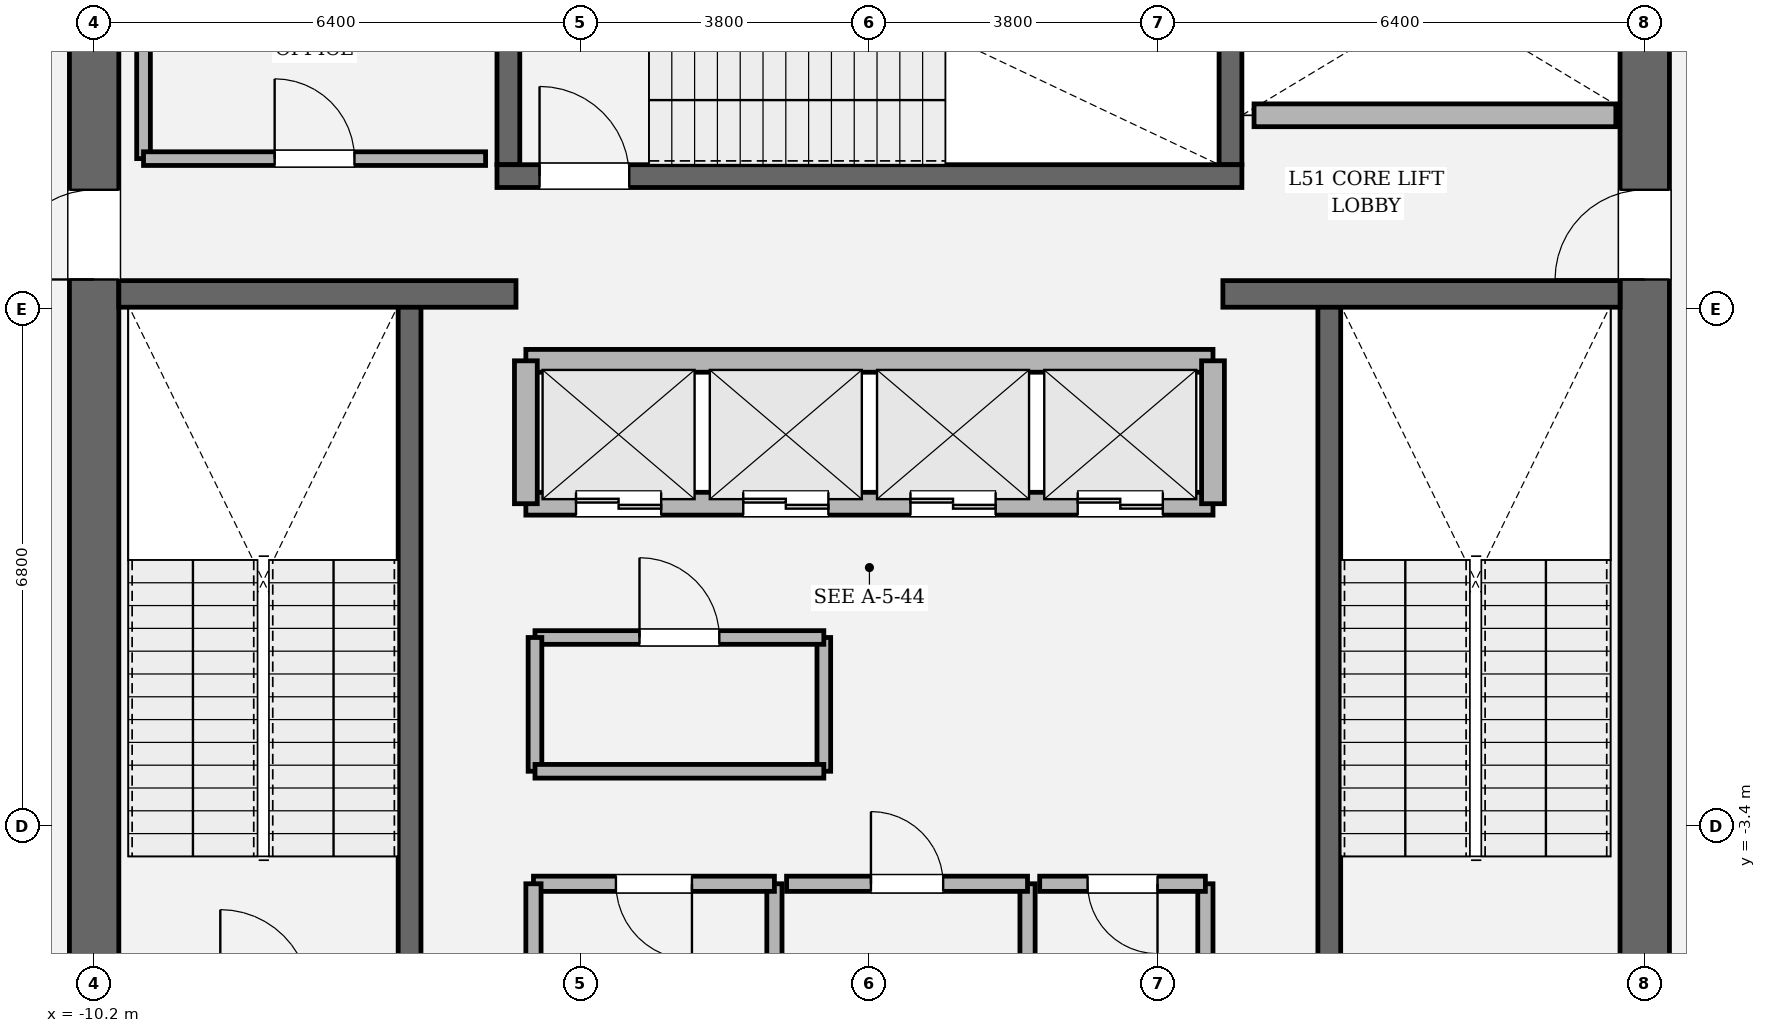
"""IFC4 building model, lengths in metres.
Left out: names, types, materials, properties, quantities, classifications, styles, units other than length and angle.
Written with IfcOpenShell. Run it as: python <this file> out.ifc"""

import sys

from ifc_helpers import new_model, si_unit, direction, frame, frame_2d, origin, place, context, subcontext, project, spatial, rectangle, extrude, element, fill, save


model = new_model("IFC4")
c1 = context("Model", 3, precision=1e-05, world=origin(), true_north=direction((0.0, 1.0)))
c2 = subcontext(c1, "Body", "Model", "MODEL_VIEW")
j1 = project(units=[si_unit("LENGTHUNIT", "METRE"), si_unit("PLANEANGLEUNIT", "RADIAN")], contexts=[c1])
p1 = place(None, origin())
s1 = spatial("IfcSite", under=j1, at=p1, CompositionType="ELEMENT")
p2 = place(p1, origin())
s2 = spatial("IfcBuilding", under=s1, at=p2, CompositionType="ELEMENT")
p3 = place(p2, frame((0.0, 0.0, 216.75)))
s3 = spatial("IfcBuildingStorey", under=s2, at=p3, CompositionType="ELEMENT", Elevation=216.75)
p4 = place(p3, frame((-10.2, -8.875, 0.0), z_axis=(0.0, 0.0, 1.0), x_axis=(0.0, 1.0, 0.0)))
e1 = element("IfcWall", 1, at=p4, inside=s3, PredefinedType="SHEAR", context=c2, shape_type="SweptSolid", body=[
    extrude(rectangle(XDim=17.75, YDim=0.65, at=frame_2d((8.875, 0.0))), origin(), (0.0, 0.0, 1.0), 4.05),
])
p5 = place(p4, frame((12.665, 0.0, 0.0)))
e2 = element("IfcOpeningElement", 2, at=p5, cuts=e1, PredefinedType="OPENING", context=c2, shape_type="SweptSolid", body=[
    extrude(rectangle(XDim=1.18, YDim=2.2, at=frame_2d((0.59, 1.1))), frame((0.0, 0.335, 0.0), z_axis=(0.0, -1.0, 0.0), x_axis=(1.0, 0.0, 0.0)), (0.0, 0.0, 1.0), 0.67),
])
p6 = place(p3, frame((10.2, 8.875, 0.0), z_axis=(0.0, 0.0, 1.0), x_axis=(0.0, -1.0, 0.0)))
e3 = element("IfcWall", 3, at=p6, inside=s3, PredefinedType="SHEAR", context=c2, shape_type="SweptSolid", body=[
    extrude(rectangle(XDim=17.75, YDim=0.65, at=frame_2d((8.875, 0.0))), origin(), (0.0, 0.0, 1.0), 4.05),
])
p7 = place(p6, frame((3.905, 0.0, 0.0)))
e4 = element("IfcOpeningElement", 4, at=p7, cuts=e3, PredefinedType="OPENING", context=c2, shape_type="SweptSolid", body=[
    extrude(rectangle(XDim=1.18, YDim=2.2, at=frame_2d((0.59, 1.1))), frame((0.0, 0.335, 0.0), z_axis=(0.0, -1.0, 0.0), x_axis=(1.0, 0.0, 0.0)), (0.0, 0.0, 1.0), 0.67),
])
for number, where, z_axis, x_axis in (
    (5, (-6.05, -5.5, 0.0), (0.0, 0.0, 1.0), (0.0, 1.0, 0.0)),
    (6, (6.05, 3.45, 0.0), (0.0, 0.0, 1.0), (0.0, -1.0, 0.0)),
):
    element("IfcWall", number, at=place(p3, frame(where, z_axis=z_axis, x_axis=x_axis)), inside=s3, PredefinedType="SOLIDWALL", context=c2, shape_type="SweptSolid", body=[
        extrude(rectangle(XDim=8.95, YDim=0.3, at=frame_2d((4.475, 0.0))), origin(), (0.0, 0.0, 1.0), 4.05),
    ])
for number, where, z_axis, x_axis in (
    (7, (-4.75, 5.3, 0.0), (0.0, 0.0, 1.0), (0.0, 1.0, 0.0)),
    (8, (4.75, 8.875, 0.0), (0.0, 0.0, 1.0), (0.0, -1.0, 0.0)),
):
    element("IfcWall", number, at=place(p3, frame(where, z_axis=z_axis, x_axis=x_axis)), inside=s3, PredefinedType="SOLIDWALL", context=c2, shape_type="SweptSolid", body=[
        extrude(rectangle(XDim=3.575, YDim=0.3, at=frame_2d((1.788, 0.0))), origin(), (0.0, 0.0, 1.0), 4.05),
    ])
p8 = place(p3, frame((-4.9, 5.15, 0.0), z_axis=(0.0, 0.0, 1.0), x_axis=(1.0, 0.0, 0.0)))
e9 = element("IfcWall", 9, at=p8, inside=s3, PredefinedType="SOLIDWALL", context=c2, shape_type="SweptSolid", body=[
    extrude(rectangle(XDim=9.8, YDim=0.3, at=frame_2d((4.9, 0.0))), origin(), (0.0, 0.0, 1.0), 4.05),
])
p9 = place(p8, frame((0.56, 0.0, 0.0)))
e10 = element("IfcOpeningElement", 10, at=p9, cuts=e9, PredefinedType="OPENING", context=c2, shape_type="SweptSolid", body=[
    extrude(rectangle(XDim=1.18, YDim=2.2, at=frame_2d((0.59, 1.1))), frame((0.0, 0.16, 0.0), z_axis=(0.0, -1.0, 0.0), x_axis=(1.0, 0.0, 0.0)), (0.0, 0.0, 1.0), 0.32),
])
for number, where, z_axis, x_axis in (
    (11, (-9.875, 3.6, 0.0), (0.0, 0.0, 1.0), (1.0, 0.0, 0.0)),
    (12, (4.65, 3.6, 0.0), (0.0, 0.0, 1.0), (1.0, 0.0, 0.0)),
):
    element("IfcWall", number, at=place(p3, frame(where, z_axis=z_axis, x_axis=x_axis)), inside=s3, PredefinedType="SOLIDWALL", context=c2, shape_type="SweptSolid", body=[
        extrude(rectangle(XDim=5.225, YDim=0.35, at=frame_2d((2.613, 0.0))), origin(), (0.0, 0.0, 1.0), 4.05),
    ])
p10 = place(p3, frame((-4.52, 0.84, 0.0), z_axis=(0.0, 0.0, 1.0), x_axis=(1.0, 0.0, 0.0)))
e13 = element("IfcWall", 13, at=p10, inside=s3, PredefinedType="SOLIDWALL", context=c2, shape_type="SweptSolid", body=[
    extrude(rectangle(XDim=9.04, YDim=0.3, at=frame_2d((4.52, 0.0))), origin(), (0.0, 0.0, 1.0), 3.83),
])
p11 = place(p10, frame((0.66, 0.0, 0.0)))
e14 = element("IfcOpeningElement", 14, at=p11, cuts=e13, PredefinedType="OPENING", context=c2, shape_type="SweptSolid", body=[
    extrude(rectangle(XDim=1.12, YDim=2.25, at=frame_2d((0.56, 1.125))), frame((0.0, 0.16, 0.0), z_axis=(0.0, -1.0, 0.0), x_axis=(1.0, 0.0, 0.0)), (0.0, 0.0, 1.0), 0.32),
])
p12 = place(p10, frame((2.86, 0.0, 0.0)))
e15 = element("IfcOpeningElement", 15, at=p12, cuts=e13, PredefinedType="OPENING", context=c2, shape_type="SweptSolid", body=[
    extrude(rectangle(XDim=1.12, YDim=2.25, at=frame_2d((0.56, 1.125))), frame((0.0, 0.16, 0.0), z_axis=(0.0, -1.0, 0.0), x_axis=(1.0, 0.0, 0.0)), (0.0, 0.0, 1.0), 0.32),
])
p13 = place(p10, frame((5.06, 0.0, 0.0)))
e16 = element("IfcOpeningElement", 16, at=p13, cuts=e13, PredefinedType="OPENING", context=c2, shape_type="SweptSolid", body=[
    extrude(rectangle(XDim=1.12, YDim=2.25, at=frame_2d((0.56, 1.125))), frame((0.0, 0.16, 0.0), z_axis=(0.0, -1.0, 0.0), x_axis=(1.0, 0.0, 0.0)), (0.0, 0.0, 1.0), 0.32),
])
p14 = place(p10, frame((7.26, 0.0, 0.0)))
e17 = element("IfcOpeningElement", 17, at=p14, cuts=e13, PredefinedType="OPENING", context=c2, shape_type="SweptSolid", body=[
    extrude(rectangle(XDim=1.12, YDim=2.25, at=frame_2d((0.56, 1.125))), frame((0.0, 0.16, 0.0), z_axis=(0.0, -1.0, 0.0), x_axis=(1.0, 0.0, 0.0)), (0.0, 0.0, 1.0), 0.32),
])
p15 = place(p3, frame((-4.52, 2.72, 0.0), z_axis=(0.0, 0.0, 1.0), x_axis=(1.0, 0.0, 0.0)))
e18 = element("IfcWall", 18, at=p15, inside=s3, PredefinedType="SOLIDWALL", context=c2, shape_type="SweptSolid", body=[
    extrude(rectangle(XDim=9.04, YDim=0.3, at=frame_2d((4.52, 0.0))), origin(), (0.0, 0.0, 1.0), 3.83),
])
for number, where, z_axis, x_axis in (
    (19, (-4.52, 0.84, 0.0), (0.0, 0.0, 1.0), (0.0, 1.0, 0.0)),
    (20, (4.52, 0.84, 0.0), (0.0, 0.0, 1.0), (0.0, 1.0, 0.0)),
):
    element("IfcWall", number, at=place(p3, frame(where, z_axis=z_axis, x_axis=x_axis)), inside=s3, PredefinedType="SOLIDWALL", context=c2, shape_type="SweptSolid", body=[
        extrude(rectangle(XDim=1.88, YDim=0.3, at=frame_2d((0.94, 0.0))), origin(), (0.0, 0.0, 1.0), 3.83),
    ])
p16 = place(p3, frame((5.06, 5.95, 0.0), z_axis=(0.0, 0.0, 1.0), x_axis=(1.0, 0.0, 0.0)))
e21 = element("IfcWall", 21, at=p16, inside=s3, PredefinedType="SOLIDWALL", context=c2, shape_type="SweptSolid", body=[
    extrude(rectangle(XDim=4.76, YDim=0.3, at=frame_2d((2.38, 0.0))), origin(), (0.0, 0.0, 1.0), 3.83),
])
p17 = place(p3, frame((-1.25, -5.9, 0.0), z_axis=(0.0, 0.0, 1.0), x_axis=(0.0, 1.0, 0.0)))
e22 = element("IfcWall", 22, at=p17, inside=s3, PredefinedType="SOLIDWALL", context=c2, shape_type="SweptSolid", body=[
    extrude(rectangle(XDim=1.74, YDim=0.2, at=frame_2d((0.87, 0.0))), origin(), (0.0, 0.0, 1.0), 3.83),
])
p18 = place(p3, frame((-1.25, -4.16, 0.0), z_axis=(0.0, 0.0, 1.0), x_axis=(-1.0, 0.0, 0.0)))
e23 = element("IfcWall", 23, at=p18, inside=s3, PredefinedType="SOLIDWALL", context=c2, shape_type="SweptSolid", body=[
    extrude(rectangle(XDim=3.17, YDim=0.2, at=frame_2d((1.585, 0.0))), origin(), (0.0, 0.0, 1.0), 3.83),
])
p19 = place(p18, frame((1.085, 0.0, 0.0)))
e24 = element("IfcOpeningElement", 24, at=p19, cuts=e23, PredefinedType="OPENING", context=c2, shape_type="SweptSolid", body=[
    extrude(rectangle(XDim=1.0, YDim=2.15, at=frame_2d((0.5, 1.075))), frame((0.0, 0.11, 0.0), z_axis=(0.0, -1.0, 0.0), x_axis=(1.0, 0.0, 0.0)), (0.0, 0.0, 1.0), 0.22),
])
for number, where, z_axis, x_axis in (
    (25, (-4.42, -4.16, 0.0), (0.0, 0.0, 1.0), (0.0, -1.0, 0.0)),
    (26, (2.08, -5.9, 0.0), (0.0, 0.0, 1.0), (0.0, 1.0, 0.0)),
):
    element("IfcWall", number, at=place(p3, frame(where, z_axis=z_axis, x_axis=x_axis)), inside=s3, PredefinedType="SOLIDWALL", context=c2, shape_type="SweptSolid", body=[
        extrude(rectangle(XDim=1.74, YDim=0.2, at=frame_2d((0.87, 0.0))), origin(), (0.0, 0.0, 1.0), 3.83),
    ])
p20 = place(p3, frame((2.08, -4.16, 0.0), z_axis=(0.0, 0.0, 1.0), x_axis=(-1.0, 0.0, 0.0)))
e27 = element("IfcWall", 27, at=p20, inside=s3, PredefinedType="SOLIDWALL", context=c2, shape_type="SweptSolid", body=[
    extrude(rectangle(XDim=3.17, YDim=0.2, at=frame_2d((1.585, 0.0))), origin(), (0.0, 0.0, 1.0), 3.83),
])
p21 = place(p20, frame((1.11, 0.0, 0.0)))
e28 = element("IfcOpeningElement", 28, at=p21, cuts=e27, PredefinedType="OPENING", context=c2, shape_type="SweptSolid", body=[
    extrude(rectangle(XDim=0.95, YDim=2.15, at=frame_2d((0.475, 1.075))), frame((0.0, 0.11, 0.0), z_axis=(0.0, -1.0, 0.0), x_axis=(1.0, 0.0, 0.0)), (0.0, 0.0, 1.0), 0.22),
])
p22 = place(p3, frame((4.42, -5.9, 0.0), z_axis=(0.0, 0.0, 1.0), x_axis=(0.0, 1.0, 0.0)))
e29 = element("IfcWall", 29, at=p22, inside=s3, PredefinedType="SOLIDWALL", context=c2, shape_type="SweptSolid", body=[
    extrude(rectangle(XDim=1.74, YDim=0.2, at=frame_2d((0.87, 0.0))), origin(), (0.0, 0.0, 1.0), 3.83),
])
p23 = place(p3, frame((4.42, -4.16, 0.0), z_axis=(0.0, 0.0, 1.0), x_axis=(-1.0, 0.0, 0.0)))
e30 = element("IfcWall", 30, at=p23, inside=s3, PredefinedType="SOLIDWALL", context=c2, shape_type="SweptSolid", body=[
    extrude(rectangle(XDim=2.18, YDim=0.2, at=frame_2d((1.09, 0.0))), origin(), (0.0, 0.0, 1.0), 3.83),
])
p24 = place(p23, frame((0.63, 0.0, 0.0)))
e31 = element("IfcOpeningElement", 31, at=p24, cuts=e30, PredefinedType="OPENING", context=c2, shape_type="SweptSolid", body=[
    extrude(rectangle(XDim=0.92, YDim=2.1, at=frame_2d((0.46, 1.05))), frame((0.0, 0.11, 0.0), z_axis=(0.0, -1.0, 0.0), x_axis=(1.0, 0.0, 0.0)), (0.0, 0.0, 1.0), 0.22),
])
p25 = place(p3, frame((-0.6, -2.68, 0.0), z_axis=(0.0, 0.0, 1.0), x_axis=(0.0, 1.0, 0.0)))
e32 = element("IfcWall", 32, at=p25, inside=s3, PredefinedType="PARTITIONING", context=c2, shape_type="SweptSolid", body=[
    extrude(rectangle(XDim=1.76, YDim=0.18, at=frame_2d((0.88, 0.0))), origin(), (0.0, 0.0, 1.0), 3.83),
])
p26 = place(p3, frame((-0.6, -0.92, 0.0), z_axis=(0.0, 0.0, 1.0), x_axis=(-1.0, 0.0, 0.0)))
e33 = element("IfcWall", 33, at=p26, inside=s3, PredefinedType="PARTITIONING", context=c2, shape_type="SweptSolid", body=[
    extrude(rectangle(XDim=3.8, YDim=0.18, at=frame_2d((1.9, 0.0))), origin(), (0.0, 0.0, 1.0), 3.83),
])
p27 = place(p26, frame((1.375, 0.0, 0.0)))
e34 = element("IfcOpeningElement", 34, at=p27, cuts=e33, PredefinedType="OPENING", context=c2, shape_type="SweptSolid", body=[
    extrude(rectangle(XDim=1.05, YDim=2.2, at=frame_2d((0.525, 1.1))), frame((0.0, 0.1, 0.0), z_axis=(0.0, -1.0, 0.0), x_axis=(1.0, 0.0, 0.0)), (0.0, 0.0, 1.0), 0.2),
])
p28 = place(p3, frame((-4.4, -0.92, 0.0), z_axis=(0.0, 0.0, 1.0), x_axis=(0.0, -1.0, 0.0)))
e35 = element("IfcWall", 35, at=p28, inside=s3, PredefinedType="PARTITIONING", context=c2, shape_type="SweptSolid", body=[
    extrude(rectangle(XDim=1.76, YDim=0.18, at=frame_2d((0.88, 0.0))), origin(), (0.0, 0.0, 1.0), 3.83),
])
p29 = place(p3, frame((-4.4, -2.68, 0.0), z_axis=(0.0, 0.0, 1.0), x_axis=(1.0, 0.0, 0.0)))
e36 = element("IfcWall", 36, at=p29, inside=s3, PredefinedType="PARTITIONING", context=c2, shape_type="SweptSolid", body=[
    extrude(rectangle(XDim=3.8, YDim=0.18, at=frame_2d((1.9, 0.0))), origin(), (0.0, 0.0, 1.0), 3.83),
])
p30 = place(p3, frame((-9.55, 8.65, 0.0), z_axis=(0.0, 0.0, 1.0), x_axis=(0.0, -1.0, 0.0)))
e37 = element("IfcWall", 37, at=p30, inside=s3, PredefinedType="PARTITIONING", context=c2, shape_type="SweptSolid", body=[
    extrude(rectangle(XDim=3.27, YDim=0.18, at=frame_2d((1.635, 0.0))), origin(), (0.0, 0.0, 1.0), 3.83),
])
p31 = place(p3, frame((-9.55, 5.38, 0.0), z_axis=(0.0, 0.0, 1.0), x_axis=(1.0, 0.0, 0.0)))
e38 = element("IfcWall", 38, at=p31, inside=s3, PredefinedType="PARTITIONING", context=c2, shape_type="SweptSolid", body=[
    extrude(rectangle(XDim=4.5, YDim=0.18, at=frame_2d((2.25, 0.0))), origin(), (0.0, 0.0, 1.0), 3.83),
])
p32 = place(p31, frame((1.725, 0.0, 0.0)))
e39 = element("IfcOpeningElement", 39, at=p32, cuts=e38, PredefinedType="OPENING", context=c2, shape_type="SweptSolid", body=[
    extrude(rectangle(XDim=1.05, YDim=2.2, at=frame_2d((0.525, 1.1))), frame((0.0, 0.1, 0.0), z_axis=(0.0, -1.0, 0.0), x_axis=(1.0, 0.0, 0.0)), (0.0, 0.0, 1.0), 0.2),
])
p33 = place(p9, origin())
e40 = element("IfcDoor", 40, at=p33, inside=s3, OperationType="SINGLE_SWING_LEFT", PredefinedType="DOOR", context=c2, shape_type="SweptSolid", body=[
    extrude(rectangle(XDim=1.18, YDim=2.2, at=frame_2d((0.59, 1.1))), frame((0.0, 0.025, 0.0), z_axis=(0.0, -1.0, 0.0), x_axis=(1.0, 0.0, 0.0)), (0.0, 0.0, 1.0), 0.05),
])
fill(e10, e40)
p34 = place(p5, origin())
e41 = element("IfcDoor", 41, at=p34, inside=s3, OperationType="SINGLE_SWING_LEFT", PredefinedType="DOOR", context=c2, shape_type="SweptSolid", body=[
    extrude(rectangle(XDim=1.18, YDim=2.2, at=frame_2d((0.59, 1.1))), frame((0.0, 0.025, 0.0), z_axis=(0.0, -1.0, 0.0), x_axis=(1.0, 0.0, 0.0)), (0.0, 0.0, 1.0), 0.05),
])
fill(e2, e41)
p35 = place(p7, origin())
e42 = element("IfcDoor", 42, at=p35, inside=s3, OperationType="SINGLE_SWING_RIGHT", PredefinedType="DOOR", context=c2, shape_type="SweptSolid", body=[
    extrude(rectangle(XDim=1.18, YDim=2.2, at=frame_2d((0.59, 1.1))), frame((0.0, 0.025, 0.0), z_axis=(0.0, -1.0, 0.0), x_axis=(1.0, 0.0, 0.0)), (0.0, 0.0, 1.0), 0.05),
])
fill(e4, e42)
p36 = place(p11, origin())
e43 = element("IfcDoor", 43, at=p36, inside=s3, OperationType="DOUBLE_DOOR_SLIDING", PredefinedType="DOOR", context=c2, shape_type="SweptSolid", body=[
    extrude(rectangle(XDim=1.12, YDim=2.25, at=frame_2d((0.56, 1.125))), frame((0.0, 0.025, 0.0), z_axis=(0.0, -1.0, 0.0), x_axis=(1.0, 0.0, 0.0)), (0.0, 0.0, 1.0), 0.05),
])
fill(e14, e43)
p37 = place(p12, origin())
e44 = element("IfcDoor", 44, at=p37, inside=s3, OperationType="DOUBLE_DOOR_SLIDING", PredefinedType="DOOR", context=c2, shape_type="SweptSolid", body=[
    extrude(rectangle(XDim=1.12, YDim=2.25, at=frame_2d((0.56, 1.125))), frame((0.0, 0.025, 0.0), z_axis=(0.0, -1.0, 0.0), x_axis=(1.0, 0.0, 0.0)), (0.0, 0.0, 1.0), 0.05),
])
fill(e15, e44)
p38 = place(p13, origin())
e45 = element("IfcDoor", 45, at=p38, inside=s3, OperationType="DOUBLE_DOOR_SLIDING", PredefinedType="DOOR", context=c2, shape_type="SweptSolid", body=[
    extrude(rectangle(XDim=1.12, YDim=2.25, at=frame_2d((0.56, 1.125))), frame((0.0, 0.025, 0.0), z_axis=(0.0, -1.0, 0.0), x_axis=(1.0, 0.0, 0.0)), (0.0, 0.0, 1.0), 0.05),
])
fill(e16, e45)
p39 = place(p14, origin())
e46 = element("IfcDoor", 46, at=p39, inside=s3, OperationType="DOUBLE_DOOR_SLIDING", PredefinedType="DOOR", context=c2, shape_type="SweptSolid", body=[
    extrude(rectangle(XDim=1.12, YDim=2.25, at=frame_2d((0.56, 1.125))), frame((0.0, 0.025, 0.0), z_axis=(0.0, -1.0, 0.0), x_axis=(1.0, 0.0, 0.0)), (0.0, 0.0, 1.0), 0.05),
])
fill(e17, e46)
p40 = place(p19, origin())
e47 = element("IfcDoor", 47, at=p40, inside=s3, OperationType="SINGLE_SWING_LEFT", PredefinedType="DOOR", context=c2, shape_type="SweptSolid", body=[
    extrude(rectangle(XDim=1.0, YDim=2.15, at=frame_2d((0.5, 1.075))), frame((0.0, 0.025, 0.0), z_axis=(0.0, -1.0, 0.0), x_axis=(1.0, 0.0, 0.0)), (0.0, 0.0, 1.0), 0.05),
])
fill(e24, e47)
p41 = place(p21, origin())
e48 = element("IfcDoor", 48, at=p41, inside=s3, OperationType="SINGLE_SWING_RIGHT", PredefinedType="DOOR", context=c2, shape_type="SweptSolid", body=[
    extrude(rectangle(XDim=0.95, YDim=2.15, at=frame_2d((0.475, 1.075))), frame((0.0, 0.025, 0.0), z_axis=(0.0, -1.0, 0.0), x_axis=(1.0, 0.0, 0.0)), (0.0, 0.0, 1.0), 0.05),
])
fill(e28, e48)
p42 = place(p24, origin())
e49 = element("IfcDoor", 49, at=p42, inside=s3, OperationType="SINGLE_SWING_LEFT", PredefinedType="DOOR", context=c2, shape_type="SweptSolid", body=[
    extrude(rectangle(XDim=0.92, YDim=2.1, at=frame_2d((0.46, 1.05))), frame((0.0, 0.025, 0.0), z_axis=(0.0, -1.0, 0.0), x_axis=(1.0, 0.0, 0.0)), (0.0, 0.0, 1.0), 0.05),
])
fill(e31, e49)
p43 = place(p27, origin())
e50 = element("IfcDoor", 50, at=p43, inside=s3, OperationType="SINGLE_SWING_RIGHT", PredefinedType="DOOR", context=c2, shape_type="SweptSolid", body=[
    extrude(rectangle(XDim=1.05, YDim=2.2, at=frame_2d((0.525, 1.1))), frame((0.0, 0.025, 0.0), z_axis=(0.0, -1.0, 0.0), x_axis=(1.0, 0.0, 0.0)), (0.0, 0.0, 1.0), 0.05),
])
fill(e34, e50)
p44 = place(p32, origin())
e51 = element("IfcDoor", 51, at=p44, inside=s3, OperationType="SINGLE_SWING_LEFT", PredefinedType="DOOR", context=c2, shape_type="SweptSolid", body=[
    extrude(rectangle(XDim=1.05, YDim=2.2, at=frame_2d((0.525, 1.1))), frame((0.0, 0.025, 0.0), z_axis=(0.0, -1.0, 0.0), x_axis=(1.0, 0.0, 0.0)), (0.0, 0.0, 1.0), 0.05),
])
fill(e39, e51)
save(model, sys.argv[1])
